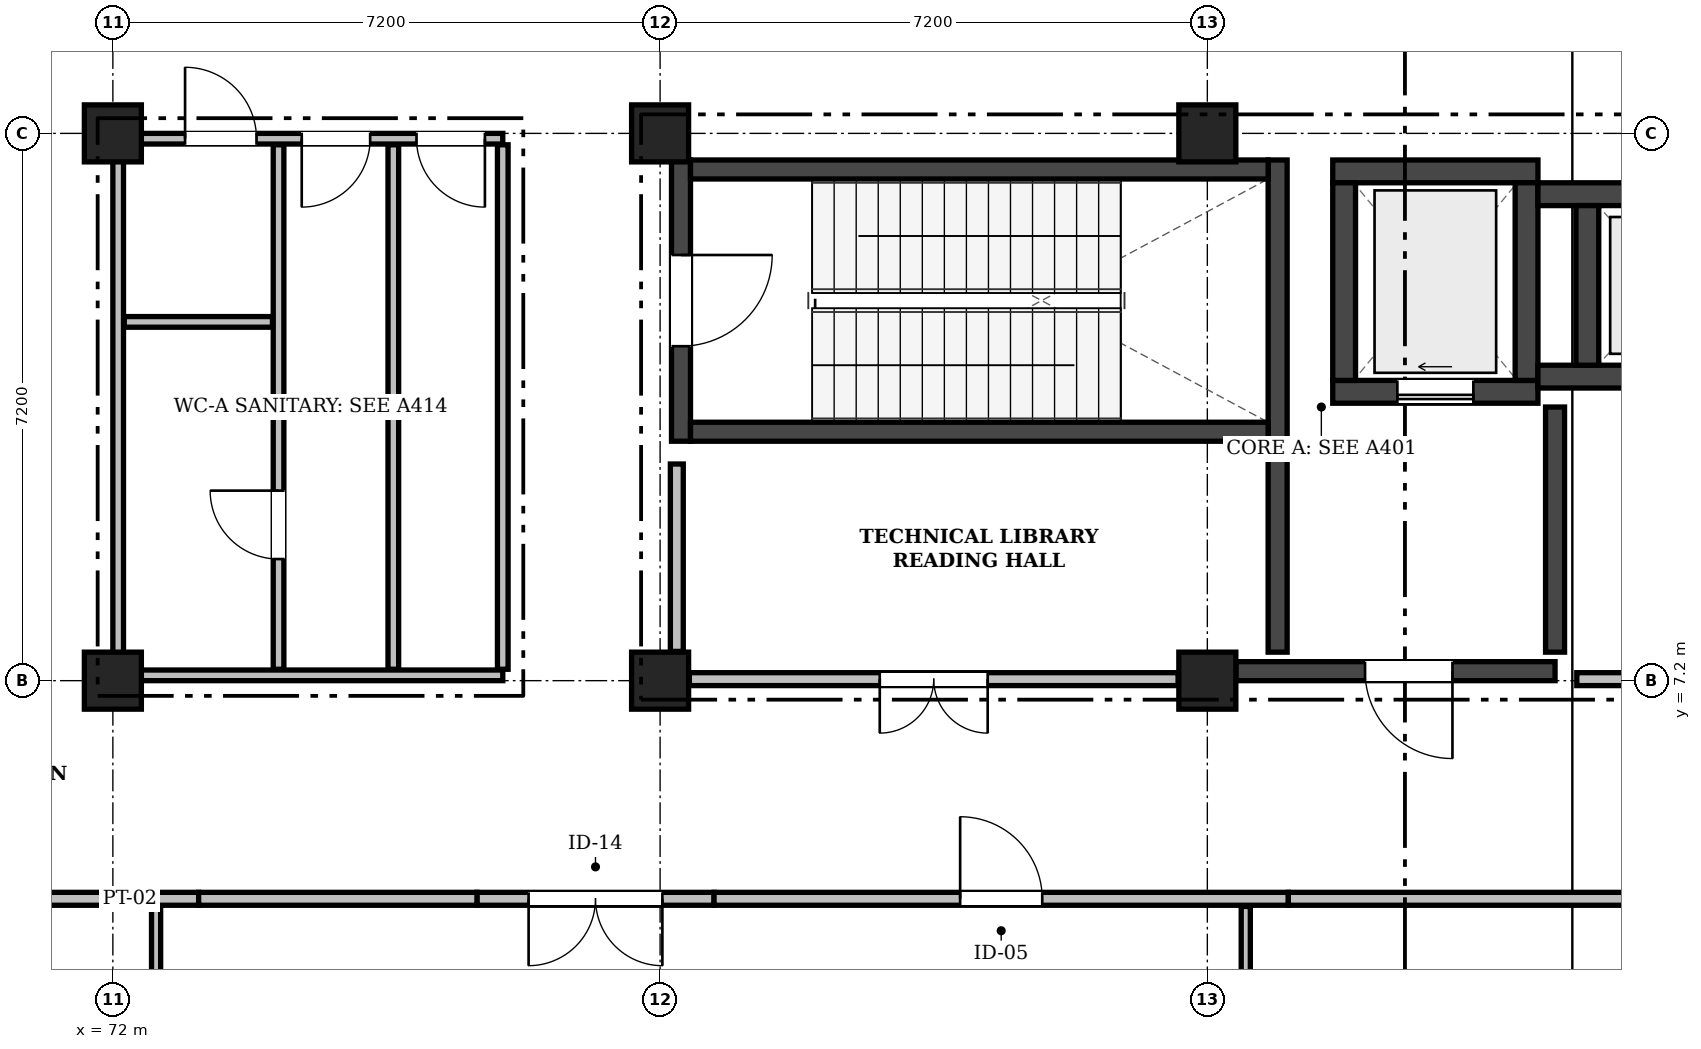
"""IFC4 building model, lengths in metres.
Left out: names, types, materials, properties, quantities, classifications, styles, units other than length and angle.
Written with IfcOpenShell. Run it as: python <this file> out.ifc"""

import sys

from ifc_helpers import new_model, si_unit, direction, frame, frame_2d, origin, origin_2d, place, context, subcontext, project, spatial, rectangle, extrude, element, fill, save


model = new_model("IFC4")
c1 = context("Model", 3, precision=1e-05, world=origin(), true_north=direction((0.0, 1.0)))
c2 = subcontext(c1, "Body", "Model", "MODEL_VIEW")
j1 = project(units=[si_unit("LENGTHUNIT", "METRE"), si_unit("PLANEANGLEUNIT", "RADIAN")], contexts=[c1])
p1 = place(None, origin())
s1 = spatial("IfcSite", under=j1, at=p1, CompositionType="ELEMENT")
p2 = place(p1, origin())
s2 = spatial("IfcBuilding", under=s1, at=p2, CompositionType="ELEMENT")
p3 = place(p2, frame((0.0, 0.0, 14.4)))
s3 = spatial("IfcBuildingStorey", under=s2, at=p3, CompositionType="ELEMENT", Elevation=14.4)
for number, where, z_axis, x_axis in (
    (1, (72.0, 7.2, 0.0), (0.0, 0.0, 1.0), (1.0, 0.0, 0.0)),
    (2, (72.0, 14.4, 0.0), (0.0, 0.0, 1.0), (1.0, 0.0, 0.0)),
    (3, (79.2, 7.2, 0.0), (0.0, 0.0, 1.0), (1.0, 0.0, 0.0)),
    (4, (79.2, 14.4, 0.0), (0.0, 0.0, 1.0), (1.0, 0.0, 0.0)),
    (5, (86.4, 7.2, 0.0), (0.0, 0.0, 1.0), (1.0, 0.0, 0.0)),
    (6, (86.4, 14.4, 0.0), (0.0, 0.0, 1.0), (1.0, 0.0, 0.0)),
):
    element("IfcColumn", number, at=place(p3, frame(where, z_axis=z_axis, x_axis=x_axis)), inside=s3, PredefinedType="COLUMN", context=c2, shape_type="SweptSolid", body=[
        extrude(rectangle(XDim=0.75, YDim=0.75, at=origin_2d()), origin(), (0.0, 0.0, 1.0), 4.5),
    ])
p4 = place(p3, frame((88.05, 11.0, 0.0), z_axis=(0.0, 0.0, 1.0), x_axis=(1.0, 0.0, 0.0)))
e7 = element("IfcWall", 7, at=p4, inside=s3, PredefinedType="SHEAR", context=c2, shape_type="SweptSolid", body=[
    extrude(rectangle(XDim=2.7, YDim=0.3, at=frame_2d((1.35, 0.0))), origin(), (0.0, 0.0, 1.0), 4.25),
])
p5 = place(p4, frame((0.85, 0.0, 0.0)))
e8 = element("IfcOpeningElement", 8, at=p5, cuts=e7, PredefinedType="OPENING", context=c2, shape_type="SweptSolid", body=[
    extrude(rectangle(XDim=1.0, YDim=2.1, at=frame_2d((0.5, 1.05))), frame((0.0, 0.162, 0.0), z_axis=(0.0, -1.0, 0.0), x_axis=(1.0, 0.0, 0.0)), (0.0, 0.0, 1.0), 0.324),
])
p6 = place(p3, frame((88.05, 13.9, 0.0), z_axis=(0.0, 0.0, 1.0), x_axis=(1.0, 0.0, 0.0)))
e9 = element("IfcWall", 9, at=p6, inside=s3, PredefinedType="SHEAR", context=c2, shape_type="SweptSolid", body=[
    extrude(rectangle(XDim=2.7, YDim=0.3, at=frame_2d((1.35, 0.0))), origin(), (0.0, 0.0, 1.0), 4.25),
])
for number, where, z_axis, x_axis in (
    (10, (88.2, 11.15, 0.0), (0.0, 0.0, 1.0), (0.0, 1.0, 0.0)),
    (11, (90.6, 11.15, 0.0), (0.0, 0.0, 1.0), (0.0, 1.0, 0.0)),
):
    element("IfcWall", number, at=place(p3, frame(where, z_axis=z_axis, x_axis=x_axis)), inside=s3, PredefinedType="SHEAR", context=c2, shape_type="SweptSolid", body=[
        extrude(rectangle(XDim=2.6, YDim=0.3, at=frame_2d((1.3, 0.0))), origin(), (0.0, 0.0, 1.0), 4.25),
    ])
p7 = place(p3, frame((90.75, 11.2, 0.0), z_axis=(0.0, 0.0, 1.0), x_axis=(1.0, 0.0, 0.0)))
e12 = element("IfcWall", 12, at=p7, inside=s3, PredefinedType="SHEAR", context=c2, shape_type="SweptSolid", body=[
    extrude(rectangle(XDim=3.0, YDim=0.3, at=frame_2d((1.5, 0.0))), origin(), (0.0, 0.0, 1.0), 4.25),
])
p8 = place(p7, frame((1.25, 0.0, 0.0)))
e13 = element("IfcOpeningElement", 13, at=p8, cuts=e12, PredefinedType="OPENING", context=c2, shape_type="SweptSolid", body=[
    extrude(rectangle(XDim=1.0, YDim=2.1, at=frame_2d((0.5, 1.05))), frame((0.0, 0.162, 0.0), z_axis=(0.0, -1.0, 0.0), x_axis=(1.0, 0.0, 0.0)), (0.0, 0.0, 1.0), 0.324),
])
p9 = place(p3, frame((90.75, 13.6, 0.0), z_axis=(0.0, 0.0, 1.0), x_axis=(1.0, 0.0, 0.0)))
e14 = element("IfcWall", 14, at=p9, inside=s3, PredefinedType="SHEAR", context=c2, shape_type="SweptSolid", body=[
    extrude(rectangle(XDim=3.0, YDim=0.3, at=frame_2d((1.5, 0.0))), origin(), (0.0, 0.0, 1.0), 4.25),
])
p10 = place(p3, frame((91.4, 11.35, 0.0), z_axis=(0.0, 0.0, 1.0), x_axis=(0.0, 1.0, 0.0)))
e15 = element("IfcWall", 15, at=p10, inside=s3, PredefinedType="SHEAR", context=c2, shape_type="SweptSolid", body=[
    extrude(rectangle(XDim=2.1, YDim=0.3, at=frame_2d((1.05, 0.0))), origin(), (0.0, 0.0, 1.0), 4.25),
])
p11 = place(p3, frame((79.475, 10.35, 0.0), z_axis=(0.0, 0.0, 1.0), x_axis=(0.0, 1.0, 0.0)))
e16 = element("IfcWall", 16, at=p11, inside=s3, PredefinedType="SHEAR", context=c2, shape_type="SweptSolid", body=[
    extrude(rectangle(XDim=3.7, YDim=0.25, at=frame_2d((1.85, 0.0))), origin(), (0.0, 0.0, 1.0), 4.25),
])
p12 = place(p11, frame((1.25, 0.0, 0.0)))
e17 = element("IfcOpeningElement", 17, at=p12, cuts=e16, PredefinedType="OPENING", context=c2, shape_type="SweptSolid", body=[
    extrude(rectangle(XDim=1.2, YDim=2.15, at=frame_2d((0.6, 1.075))), frame((0.0, 0.137, 0.0), z_axis=(0.0, -1.0, 0.0), x_axis=(1.0, 0.0, 0.0)), (0.0, 0.0, 1.0), 0.274),
])
p13 = place(p3, frame((87.325, 10.35, 0.0), z_axis=(0.0, 0.0, 1.0), x_axis=(0.0, 1.0, 0.0)))
e18 = element("IfcWall", 18, at=p13, inside=s3, PredefinedType="SHEAR", context=c2, shape_type="SweptSolid", body=[
    extrude(rectangle(XDim=3.7, YDim=0.25, at=frame_2d((1.85, 0.0))), origin(), (0.0, 0.0, 1.0), 4.25),
])
for number, where, z_axis, x_axis in (
    (19, (79.6, 10.475, 0.0), (0.0, 0.0, 1.0), (1.0, 0.0, 0.0)),
    (20, (79.6, 13.925, 0.0), (0.0, 0.0, 1.0), (1.0, 0.0, 0.0)),
):
    element("IfcWall", number, at=place(p3, frame(where, z_axis=z_axis, x_axis=x_axis)), inside=s3, PredefinedType="SHEAR", context=c2, shape_type="SweptSolid", body=[
        extrude(rectangle(XDim=7.6, YDim=0.25, at=frame_2d((3.8, 0.0))), origin(), (0.0, 0.0, 1.0), 4.25),
    ])
p14 = place(p3, frame((86.775, 7.325, 0.0), z_axis=(0.0, 0.0, 1.0), x_axis=(1.0, 0.0, 0.0)))
e21 = element("IfcWall", 21, at=p14, inside=s3, PredefinedType="SHEAR", context=c2, shape_type="SweptSolid", body=[
    extrude(rectangle(XDim=4.2, YDim=0.25, at=frame_2d((2.1, 0.0))), origin(), (0.0, 0.0, 1.0), 4.25),
])
p15 = place(p14, frame((1.7, 0.0, 0.0)))
e22 = element("IfcOpeningElement", 22, at=p15, cuts=e21, PredefinedType="OPENING", context=c2, shape_type="SweptSolid", body=[
    extrude(rectangle(XDim=1.15, YDim=2.15, at=frame_2d((0.575, 1.075))), frame((0.0, 0.137, 0.0), z_axis=(0.0, -1.0, 0.0), x_axis=(1.0, 0.0, 0.0)), (0.0, 0.0, 1.0), 0.274),
])
p16 = place(p3, frame((87.325, 7.575, 0.0), z_axis=(0.0, 0.0, 1.0), x_axis=(0.0, 1.0, 0.0)))
e23 = element("IfcWall", 23, at=p16, inside=s3, PredefinedType="SHEAR", context=c2, shape_type="SweptSolid", body=[
    extrude(rectangle(XDim=2.77, YDim=0.25, at=frame_2d((1.385, 0.0))), origin(), (0.0, 0.0, 1.0), 4.25),
])
p17 = place(p3, frame((90.975, 7.575, 0.0), z_axis=(0.0, 0.0, 1.0), x_axis=(0.0, 1.0, 0.0)))
e24 = element("IfcWall", 24, at=p17, inside=s3, PredefinedType="SHEAR", context=c2, shape_type="SweptSolid", body=[
    extrude(rectangle(XDim=3.225, YDim=0.25, at=frame_2d((1.613, 0.0))), origin(), (0.0, 0.0, 1.0), 4.25),
])
p18 = place(p3, frame((72.07, 7.27, 0.0), z_axis=(0.0, 0.0, 1.0), x_axis=(1.0, 0.0, 0.0)))
e25 = element("IfcWall", 25, at=p18, inside=s3, PredefinedType="PARTITIONING", context=c2, shape_type="SweptSolid", body=[
    extrude(rectangle(XDim=5.06, YDim=0.14, at=frame_2d((2.53, 0.0))), origin(), (0.0, 0.0, 1.0), 3.7),
])
p19 = place(p3, frame((72.07, 14.33, 0.0), z_axis=(0.0, 0.0, 1.0), x_axis=(1.0, 0.0, 0.0)))
e26 = element("IfcWall", 26, at=p19, inside=s3, PredefinedType="PARTITIONING", context=c2, shape_type="SweptSolid", body=[
    extrude(rectangle(XDim=5.06, YDim=0.14, at=frame_2d((2.53, 0.0))), origin(), (0.0, 0.0, 1.0), 3.7),
])
p20 = place(p19, frame((0.88, 0.0, 0.0)))
e27 = element("IfcOpeningElement", 27, at=p20, cuts=e26, PredefinedType="OPENING", context=c2, shape_type="SweptSolid", body=[
    extrude(rectangle(XDim=0.94, YDim=2.1, at=frame_2d((0.47, 1.05))), frame((0.0, 0.082, 0.0), z_axis=(0.0, -1.0, 0.0), x_axis=(1.0, 0.0, 0.0)), (0.0, 0.0, 1.0), 0.164),
])
p21 = place(p19, frame((2.415, 0.0, 0.0)))
e28 = element("IfcOpeningElement", 28, at=p21, cuts=e26, PredefinedType="OPENING", context=c2, shape_type="SweptSolid", body=[
    extrude(rectangle(XDim=0.9, YDim=2.08, at=frame_2d((0.45, 1.04))), frame((0.0, 0.082, 0.0), z_axis=(0.0, -1.0, 0.0), x_axis=(1.0, 0.0, 0.0)), (0.0, 0.0, 1.0), 0.164),
])
p22 = place(p19, frame((3.925, 0.0, 0.0)))
e29 = element("IfcOpeningElement", 29, at=p22, cuts=e26, PredefinedType="OPENING", context=c2, shape_type="SweptSolid", body=[
    extrude(rectangle(XDim=0.9, YDim=2.08, at=frame_2d((0.45, 1.04))), frame((0.0, 0.082, 0.0), z_axis=(0.0, -1.0, 0.0), x_axis=(1.0, 0.0, 0.0)), (0.0, 0.0, 1.0), 0.164),
])
p23 = place(p3, frame((72.07, 7.35, 0.0), z_axis=(0.0, 0.0, 1.0), x_axis=(0.0, 1.0, 0.0)))
e30 = element("IfcWall", 30, at=p23, inside=s3, PredefinedType="PARTITIONING", context=c2, shape_type="SweptSolid", body=[
    extrude(rectangle(XDim=6.9, YDim=0.14, at=frame_2d((3.45, 0.0))), origin(), (0.0, 0.0, 1.0), 3.73),
])
p24 = place(p3, frame((77.13, 7.35, 0.0), z_axis=(0.0, 0.0, 1.0), x_axis=(0.0, 1.0, 0.0)))
e31 = element("IfcWall", 31, at=p24, inside=s3, PredefinedType="PARTITIONING", context=c2, shape_type="SweptSolid", body=[
    extrude(rectangle(XDim=6.9, YDim=0.14, at=frame_2d((3.45, 0.0))), origin(), (0.0, 0.0, 1.0), 4.16),
])
p25 = place(p3, frame((74.18, 7.35, 0.0), z_axis=(0.0, 0.0, 1.0), x_axis=(0.0, 1.0, 0.0)))
e32 = element("IfcWall", 32, at=p25, inside=s3, PredefinedType="PARTITIONING", context=c2, shape_type="SweptSolid", body=[
    extrude(rectangle(XDim=6.9, YDim=0.14, at=frame_2d((3.45, 0.0))), origin(), (0.0, 0.0, 1.0), 4.16),
])
p26 = place(p25, frame((1.45, 0.0, 0.0)))
e33 = element("IfcOpeningElement", 33, at=p26, cuts=e32, PredefinedType="OPENING", context=c2, shape_type="SweptSolid", body=[
    extrude(rectangle(XDim=0.9, YDim=2.08, at=frame_2d((0.45, 1.04))), frame((0.0, 0.082, 0.0), z_axis=(0.0, -1.0, 0.0), x_axis=(1.0, 0.0, 0.0)), (0.0, 0.0, 1.0), 0.164),
])
p27 = place(p3, frame((75.69, 7.35, 0.0), z_axis=(0.0, 0.0, 1.0), x_axis=(0.0, 1.0, 0.0)))
e34 = element("IfcWall", 34, at=p27, inside=s3, PredefinedType="PARTITIONING", context=c2, shape_type="SweptSolid", body=[
    extrude(rectangle(XDim=6.9, YDim=0.14, at=frame_2d((3.45, 0.0))), origin(), (0.0, 0.0, 1.0), 4.16),
])
p28 = place(p3, frame((72.15, 11.92, 0.0), z_axis=(0.0, 0.0, 1.0), x_axis=(1.0, 0.0, 0.0)))
e35 = element("IfcWall", 35, at=p28, inside=s3, PredefinedType="PARTITIONING", context=c2, shape_type="SweptSolid", body=[
    extrude(rectangle(XDim=1.95, YDim=0.14, at=frame_2d((0.975, 0.0))), origin(), (0.0, 0.0, 1.0), 4.16),
])
p29 = place(p3, frame((76.79, 4.33, 0.0), z_axis=(0.0, 0.0, 1.0), x_axis=(1.0, 0.0, 0.0)))
e36 = element("IfcWall", 36, at=p29, inside=s3, PredefinedType="PARTITIONING", context=c2, shape_type="SweptSolid", body=[
    extrude(rectangle(XDim=3.12, YDim=0.17, at=frame_2d((1.56, 0.0))), origin(), (0.0, 0.0, 1.0), 4.16),
])
p30 = place(p29, frame((0.68, 0.0, 0.0)))
e37 = element("IfcOpeningElement", 37, at=p30, cuts=e36, PredefinedType="OPENING", context=c2, shape_type="SweptSolid", body=[
    extrude(rectangle(XDim=1.76, YDim=2.3, at=frame_2d((0.88, 1.15))), frame((0.0, 0.097, 0.0), z_axis=(0.0, -1.0, 0.0), x_axis=(1.0, 0.0, 0.0)), (0.0, 0.0, 1.0), 0.194),
])
p31 = place(p3, frame((79.42, 7.585, 0.0), z_axis=(0.0, 0.0, 1.0), x_axis=(0.0, 1.0, 0.0)))
e38 = element("IfcWall", 38, at=p31, inside=s3, PredefinedType="PARTITIONING", context=c2, shape_type="SweptSolid", body=[
    extrude(rectangle(XDim=2.465, YDim=0.17, at=frame_2d((1.233, 0.0))), origin(), (0.0, 0.0, 1.0), 3.73),
])
p32 = place(p3, frame((79.91, 4.33, 0.0), z_axis=(0.0, 0.0, 1.0), x_axis=(1.0, 0.0, 0.0)))
e39 = element("IfcWall", 39, at=p32, inside=s3, PredefinedType="PARTITIONING", context=c2, shape_type="SweptSolid", body=[
    extrude(rectangle(XDim=7.556, YDim=0.17, at=frame_2d((3.778, 0.0))), origin(), (0.0, 0.0, 1.0), 4.16),
])
p33 = place(p32, frame((3.238, 0.0, 0.0)))
e40 = element("IfcOpeningElement", 40, at=p33, cuts=e39, PredefinedType="OPENING", context=c2, shape_type="SweptSolid", body=[
    extrude(rectangle(XDim=1.08, YDim=2.2, at=frame_2d((0.54, 1.1))), frame((0.0, 0.097, 0.0), z_axis=(0.0, -1.0, 0.0), x_axis=(1.0, 0.0, 0.0)), (0.0, 0.0, 1.0), 0.194),
])
p34 = place(p3, frame((87.466, 4.33, 0.0), z_axis=(0.0, 0.0, 1.0), x_axis=(1.0, 0.0, 0.0)))
e41 = element("IfcWall", 41, at=p34, inside=s3, PredefinedType="PARTITIONING", context=c2, shape_type="SweptSolid", body=[
    extrude(rectangle(XDim=14.337, YDim=0.17, at=frame_2d((7.168, 0.0))), origin(), (0.0, 0.0, 1.0), 4.16),
])
p35 = place(p34, frame((6.208, 0.0, 0.0)))
e42 = element("IfcOpeningElement", 42, at=p35, cuts=e41, PredefinedType="OPENING", context=c2, shape_type="SweptSolid", body=[
    extrude(rectangle(XDim=1.92, YDim=2.32, at=frame_2d((0.96, 1.16))), frame((0.0, 0.097, 0.0), z_axis=(0.0, -1.0, 0.0), x_axis=(1.0, 0.0, 0.0)), (0.0, 0.0, 1.0), 0.194),
])
p36 = place(p34, frame((11.487, 0.0, 1.05)))
e43 = element("IfcOpeningElement", 43, at=p36, cuts=e41, PredefinedType="OPENING", context=c2, shape_type="SweptSolid", body=[
    extrude(rectangle(XDim=2.4, YDim=1.15, at=frame_2d((1.2, 0.575))), frame((0.0, 0.097, 0.0), z_axis=(0.0, -1.0, 0.0), x_axis=(1.0, 0.0, 0.0)), (0.0, 0.0, 1.0), 0.194),
])
p37 = place(p3, frame((79.585, 7.22, 0.0), z_axis=(0.0, 0.0, 1.0), x_axis=(1.0, 0.0, 0.0)))
e44 = element("IfcWall", 44, at=p37, inside=s3, PredefinedType="PARTITIONING", context=c2, shape_type="SweptSolid", body=[
    extrude(rectangle(XDim=6.43, YDim=0.17, at=frame_2d((3.215, 0.0))), origin(), (0.0, 0.0, 1.0), 3.7),
])
p38 = place(p37, frame((2.505, 0.0, 0.0)))
e45 = element("IfcOpeningElement", 45, at=p38, cuts=e44, PredefinedType="OPENING", context=c2, shape_type="SweptSolid", body=[
    extrude(rectangle(XDim=1.42, YDim=2.24, at=frame_2d((0.71, 1.12))), frame((0.0, 0.097, 0.0), z_axis=(0.0, -1.0, 0.0), x_axis=(1.0, 0.0, 0.0)), (0.0, 0.0, 1.0), 0.194),
])
p39 = place(p3, frame((91.261, 7.22, 0.0), z_axis=(0.0, 0.0, 1.0), x_axis=(1.0, 0.0, 0.0)))
e46 = element("IfcWall", 46, at=p39, inside=s3, PredefinedType="PARTITIONING", context=c2, shape_type="SweptSolid", body=[
    extrude(rectangle(XDim=1.954, YDim=0.17, at=frame_2d((0.977, 0.0))), origin(), (0.0, 0.0, 1.0), 3.7),
])
p40 = place(p3, frame((58.792, 4.33, 0.0), z_axis=(0.0, 0.0, 1.0), x_axis=(1.0, 0.0, 0.0)))
e47 = element("IfcWall", 47, at=p40, inside=s3, PredefinedType="PARTITIONING", context=c2, shape_type="SweptSolid", body=[
    extrude(rectangle(XDim=14.337, YDim=0.17, at=frame_2d((7.168, 0.0))), origin(), (0.0, 0.0, 1.0), 4.16),
])
p41 = place(p40, frame((6.149, 0.0, 0.0)))
e48 = element("IfcOpeningElement", 48, at=p41, cuts=e47, PredefinedType="OPENING", context=c2, shape_type="SweptSolid", body=[
    extrude(rectangle(XDim=2.04, YDim=2.34, at=frame_2d((1.02, 1.17))), frame((0.0, 0.097, 0.0), z_axis=(0.0, -1.0, 0.0), x_axis=(1.0, 0.0, 0.0)), (0.0, 0.0, 1.0), 0.194),
])
p42 = place(p3, frame((73.129, 4.33, 0.0), z_axis=(0.0, 0.0, 1.0), x_axis=(1.0, 0.0, 0.0)))
e49 = element("IfcWall", 49, at=p42, inside=s3, PredefinedType="PARTITIONING", context=c2, shape_type="SweptSolid", body=[
    extrude(rectangle(XDim=3.661, YDim=0.17, at=frame_2d((1.831, 0.0))), origin(), (0.0, 0.0, 1.0), 4.16),
])
for number, where, z_axis, x_axis in (
    (50, (72.569, 0.122, 0.0), (0.0, 0.0, 1.0), (0.0, 1.0, 0.0)),
    (51, (86.906, 0.122, 0.0), (0.0, 0.0, 1.0), (0.0, 1.0, 0.0)),
):
    element("IfcWall", number, at=place(p3, frame(where, z_axis=z_axis, x_axis=x_axis)), inside=s3, PredefinedType="PARTITIONING", context=c2, shape_type="SweptSolid", body=[
        extrude(rectangle(XDim=4.108, YDim=0.12, at=frame_2d((2.054, 0.0))), origin(), (0.0, 0.0, 1.0), 4.16),
    ])
p43 = place(p5, frame((1.0, 0.0, 0.0), z_axis=(0.0, 0.0, 1.0), x_axis=(-1.0, 0.0, 0.0)))
e52 = element("IfcDoor", 52, at=p43, inside=s3, OperationType="SLIDING_TO_LEFT", PredefinedType="DOOR", context=c2, shape_type="SweptSolid", body=[
    extrude(rectangle(XDim=1.0, YDim=2.1, at=frame_2d((0.5, 1.05))), frame((0.0, 0.025, 0.0), z_axis=(0.0, -1.0, 0.0), x_axis=(1.0, 0.0, 0.0)), (0.0, 0.0, 1.0), 0.05),
])
fill(e8, e52)
p44 = place(p12, frame((1.2, 0.0, 0.0), z_axis=(0.0, 0.0, 1.0), x_axis=(-1.0, 0.0, 0.0)))
e53 = element("IfcDoor", 53, at=p44, inside=s3, OperationType="SINGLE_SWING_LEFT", PredefinedType="DOOR", context=c2, shape_type="SweptSolid", body=[
    extrude(rectangle(XDim=1.2, YDim=2.15, at=frame_2d((0.6, 1.075))), frame((0.0, 0.025, 0.0), z_axis=(0.0, -1.0, 0.0), x_axis=(1.0, 0.0, 0.0)), (0.0, 0.0, 1.0), 0.05),
])
fill(e17, e53)
p45 = place(p15, frame((1.15, 0.0, 0.0), z_axis=(0.0, 0.0, 1.0), x_axis=(-1.0, 0.0, 0.0)))
e54 = element("IfcDoor", 54, at=p45, inside=s3, OperationType="SINGLE_SWING_LEFT", PredefinedType="DOOR", context=c2, shape_type="SweptSolid", body=[
    extrude(rectangle(XDim=1.15, YDim=2.15, at=frame_2d((0.575, 1.075))), frame((0.0, 0.025, 0.0), z_axis=(0.0, -1.0, 0.0), x_axis=(1.0, 0.0, 0.0)), (0.0, 0.0, 1.0), 0.05),
])
fill(e22, e54)
p46 = place(p20, origin())
e55 = element("IfcDoor", 55, at=p46, inside=s3, OperationType="SINGLE_SWING_LEFT", PredefinedType="DOOR", context=c2, shape_type="SweptSolid", body=[
    extrude(rectangle(XDim=0.94, YDim=2.1, at=frame_2d((0.47, 1.05))), frame((0.0, 0.025, 0.0), z_axis=(0.0, -1.0, 0.0), x_axis=(1.0, 0.0, 0.0)), (0.0, 0.0, 1.0), 0.05),
])
fill(e27, e55)
p47 = place(p21, frame((0.9, 0.0, 0.0), z_axis=(0.0, 0.0, 1.0), x_axis=(-1.0, 0.0, 0.0)))
e56 = element("IfcDoor", 56, at=p47, inside=s3, OperationType="SINGLE_SWING_RIGHT", PredefinedType="DOOR", context=c2, shape_type="SweptSolid", body=[
    extrude(rectangle(XDim=0.9, YDim=2.08, at=frame_2d((0.45, 1.04))), frame((0.0, 0.025, 0.0), z_axis=(0.0, -1.0, 0.0), x_axis=(1.0, 0.0, 0.0)), (0.0, 0.0, 1.0), 0.05),
])
fill(e28, e56)
p48 = place(p22, frame((0.9, 0.0, 0.0), z_axis=(0.0, 0.0, 1.0), x_axis=(-1.0, 0.0, 0.0)))
e57 = element("IfcDoor", 57, at=p48, inside=s3, OperationType="SINGLE_SWING_LEFT", PredefinedType="DOOR", context=c2, shape_type="SweptSolid", body=[
    extrude(rectangle(XDim=0.9, YDim=2.08, at=frame_2d((0.45, 1.04))), frame((0.0, 0.025, 0.0), z_axis=(0.0, -1.0, 0.0), x_axis=(1.0, 0.0, 0.0)), (0.0, 0.0, 1.0), 0.05),
])
fill(e29, e57)
p49 = place(p26, origin())
e58 = element("IfcDoor", 58, at=p49, inside=s3, OperationType="SINGLE_SWING_RIGHT", PredefinedType="DOOR", context=c2, shape_type="SweptSolid", body=[
    extrude(rectangle(XDim=0.9, YDim=2.08, at=frame_2d((0.45, 1.04))), frame((0.0, 0.025, 0.0), z_axis=(0.0, -1.0, 0.0), x_axis=(1.0, 0.0, 0.0)), (0.0, 0.0, 1.0), 0.05),
])
fill(e33, e58)
p50 = place(p33, origin())
e59 = element("IfcDoor", 59, at=p50, inside=s3, OperationType="SINGLE_SWING_LEFT", PredefinedType="DOOR", context=c2, shape_type="SweptSolid", body=[
    extrude(rectangle(XDim=1.08, YDim=2.2, at=frame_2d((0.54, 1.1))), frame((0.0, 0.025, 0.0), z_axis=(0.0, -1.0, 0.0), x_axis=(1.0, 0.0, 0.0)), (0.0, 0.0, 1.0), 0.05),
])
fill(e40, e59)
p51 = place(p38, frame((1.42, 0.0, 0.0), z_axis=(0.0, 0.0, 1.0), x_axis=(-1.0, 0.0, 0.0)))
e60 = element("IfcDoor", 60, at=p51, inside=s3, OperationType="DOUBLE_DOOR_SINGLE_SWING", PredefinedType="DOOR", context=c2, shape_type="SweptSolid", body=[
    extrude(rectangle(XDim=1.42, YDim=2.24, at=frame_2d((0.71, 1.12))), frame((0.0, 0.025, 0.0), z_axis=(0.0, -1.0, 0.0), x_axis=(1.0, 0.0, 0.0)), (0.0, 0.0, 1.0), 0.05),
])
fill(e45, e60)
p52 = place(p30, frame((1.76, 0.0, 0.0), z_axis=(0.0, 0.0, 1.0), x_axis=(-1.0, 0.0, 0.0)))
e61 = element("IfcDoor", 61, at=p52, inside=s3, OperationType="DOUBLE_DOOR_SINGLE_SWING", PredefinedType="DOOR", context=c2, shape_type="SweptSolid", body=[
    extrude(rectangle(XDim=1.76, YDim=2.3, at=frame_2d((0.88, 1.15))), frame((0.0, 0.025, 0.0), z_axis=(0.0, -1.0, 0.0), x_axis=(1.0, 0.0, 0.0)), (0.0, 0.0, 1.0), 0.05),
])
fill(e37, e61)
save(model, sys.argv[1])
